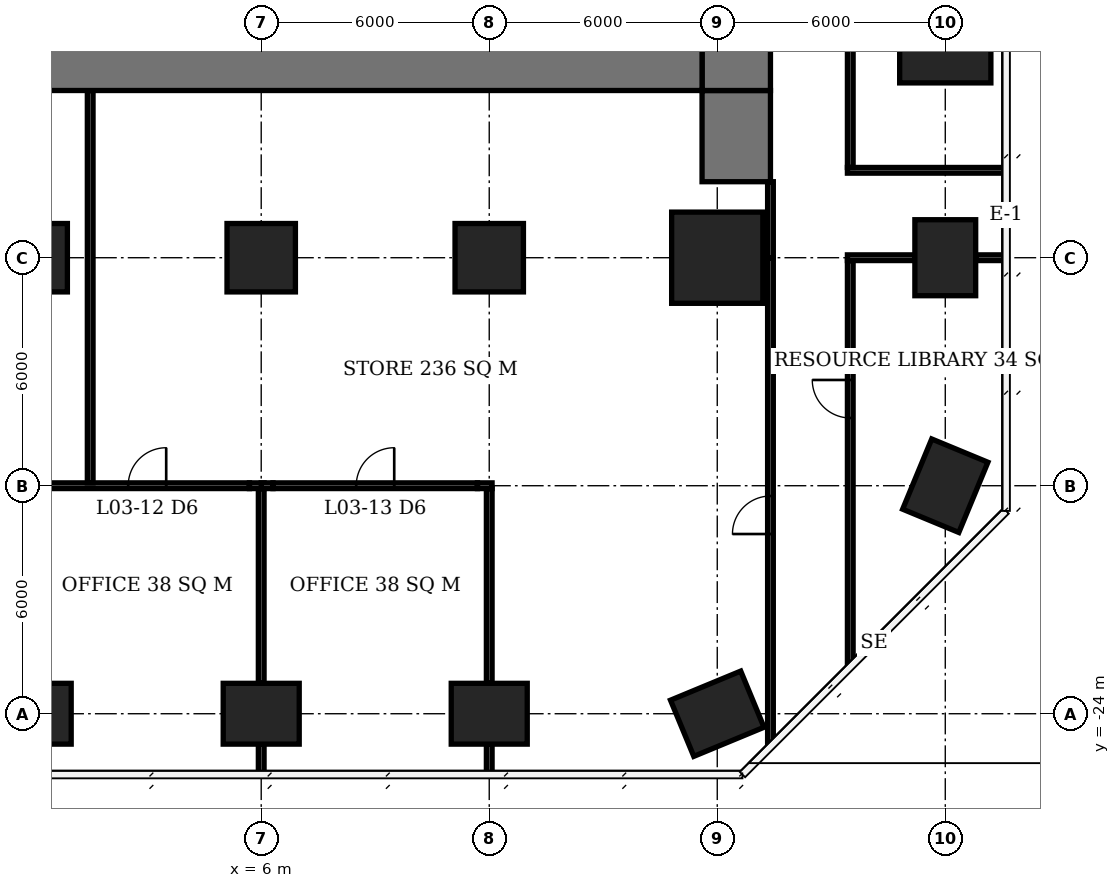
"""IFC4 building model, lengths in metres.
Left out: names, types, materials, properties, quantities, classifications, styles, units other than length and angle.
Written with IfcOpenShell. Run it as: python <this file> out.ifc"""

import sys

from ifc_helpers import new_model, si_unit, direction, frame, frame_2d, origin, origin_2d, place, context, subcontext, project, spatial, rectangle, extrude, element, fill, save


model = new_model("IFC4")
c1 = context("Model", 3, precision=1e-05, world=origin(), true_north=direction((0.0, 1.0)))
c2 = subcontext(c1, "Body", "Model", "MODEL_VIEW")
j1 = project(units=[si_unit("LENGTHUNIT", "METRE"), si_unit("PLANEANGLEUNIT", "RADIAN")], contexts=[c1])
p1 = place(None, origin())
s1 = spatial("IfcSite", under=j1, at=p1, CompositionType="ELEMENT")
p2 = place(p1, origin())
s2 = spatial("IfcBuilding", under=s1, at=p2, CompositionType="ELEMENT")
p3 = place(p2, frame((0.0, 0.0, 18.2)))
s3 = spatial("IfcBuildingStorey", under=s2, at=p3, CompositionType="ELEMENT", Elevation=18.2)
p4 = place(p3, frame((0.0, -24.0, 0.0), z_axis=(0.0, 0.0, 1.0), x_axis=(1.0, 0.0, 0.0)))
e1 = element("IfcColumn", 1, at=p4, inside=s3, PredefinedType="COLUMN", context=c2, shape_type="SweptSolid", body=[
    extrude(rectangle(XDim=2.0, YDim=1.6, at=origin_2d()), origin(), (0.0, 0.0, 1.0), 3.9),
])
p5 = place(p3, frame((0.0, -12.0, 0.0), z_axis=(0.0, 0.0, 1.0), x_axis=(1.0, 0.0, 0.0)))
e2 = element("IfcColumn", 2, at=p5, inside=s3, PredefinedType="COLUMN", context=c2, shape_type="SweptSolid", body=[
    extrude(rectangle(XDim=1.8, YDim=1.8, at=origin_2d()), origin(), (0.0, 0.0, 1.0), 3.9),
])
p6 = place(p3, frame((6.0, -24.0, 0.0), z_axis=(0.0, 0.0, 1.0), x_axis=(1.0, 0.0, 0.0)))
e3 = element("IfcColumn", 3, at=p6, inside=s3, PredefinedType="COLUMN", context=c2, shape_type="SweptSolid", body=[
    extrude(rectangle(XDim=2.0, YDim=1.6, at=origin_2d()), origin(), (0.0, 0.0, 1.0), 3.9),
])
p7 = place(p3, frame((6.0, -12.0, 0.0), z_axis=(0.0, 0.0, 1.0), x_axis=(1.0, 0.0, 0.0)))
e4 = element("IfcColumn", 4, at=p7, inside=s3, PredefinedType="COLUMN", context=c2, shape_type="SweptSolid", body=[
    extrude(rectangle(XDim=1.8, YDim=1.8, at=origin_2d()), origin(), (0.0, 0.0, 1.0), 3.9),
])
p8 = place(p3, frame((12.0, -24.0, 0.0), z_axis=(0.0, 0.0, 1.0), x_axis=(1.0, 0.0, 0.0)))
e5 = element("IfcColumn", 5, at=p8, inside=s3, PredefinedType="COLUMN", context=c2, shape_type="SweptSolid", body=[
    extrude(rectangle(XDim=2.0, YDim=1.6, at=origin_2d()), origin(), (0.0, 0.0, 1.0), 3.9),
])
p9 = place(p3, frame((12.0, -12.0, 0.0), z_axis=(0.0, 0.0, 1.0), x_axis=(1.0, 0.0, 0.0)))
e6 = element("IfcColumn", 6, at=p9, inside=s3, PredefinedType="COLUMN", context=c2, shape_type="SweptSolid", body=[
    extrude(rectangle(XDim=1.8, YDim=1.8, at=origin_2d()), origin(), (0.0, 0.0, 1.0), 3.9),
])
p10 = place(p3, frame((18.0, -24.0, 0.0), z_axis=(0.0, 0.0, 1.0), x_axis=(-0.923879532511, -0.382683432365, 0.0)))
e7 = element("IfcColumn", 7, at=p10, inside=s3, PredefinedType="COLUMN", context=c2, shape_type="SweptSolid", body=[
    extrude(rectangle(XDim=2.0, YDim=1.6, at=origin_2d()), origin(), (0.0, 0.0, 1.0), 3.9),
])
p11 = place(p3, frame((18.0, -12.0, 0.0), z_axis=(0.0, 0.0, 1.0), x_axis=(1.0, 0.0, 0.0)))
e8 = element("IfcColumn", 8, at=p11, inside=s3, PredefinedType="COLUMN", context=c2, shape_type="SweptSolid", body=[
    extrude(rectangle(XDim=2.4, YDim=2.4, at=origin_2d()), origin(), (0.0, 0.0, 1.0), 3.9),
])
for number, where, z_axis, x_axis in (
    (9, (24.0, -18.0, 0.0), (0.0, 0.0, 1.0), (-0.383, -0.924, 0.0)),
    (10, (24.0, -12.0, 0.0), (0.0, 0.0, 1.0), (0.0, 1.0, 0.0)),
):
    element("IfcColumn", number, at=place(p3, frame(where, z_axis=z_axis, x_axis=x_axis)), inside=s3, PredefinedType="COLUMN", context=c2, shape_type="SweptSolid", body=[
        extrude(rectangle(XDim=2.0, YDim=1.6, at=origin_2d()), origin(), (0.0, 0.0, 1.0), 3.9),
    ])
p12 = place(p3, frame((24.0, -6.0, 0.0), z_axis=(0.0, 0.0, 1.0), x_axis=(0.0, 1.0, 0.0)))
e11 = element("IfcColumn", 11, at=p12, inside=s3, PredefinedType="COLUMN", context=c2, shape_type="SweptSolid", body=[
    extrude(rectangle(XDim=2.8, YDim=2.4, at=origin_2d()), origin(), (0.0, 0.0, 1.0), 3.9),
])
p13 = place(p3, frame((-5.6, -6.6, 0.0), z_axis=(0.0, 0.0, 1.0), x_axis=(1.0, 0.0, 0.0)))
e12 = element("IfcWall", 12, at=p13, inside=s3, PredefinedType="SHEAR", context=c2, shape_type="SweptSolid", body=[
    extrude(rectangle(XDim=23.2, YDim=2.0, at=frame_2d((11.6, 0.0))), origin(), (0.0, 0.0, 1.0), 3.9),
])
p14 = place(p3, frame((18.5, -7.6, 0.0), z_axis=(0.0, 0.0, 1.0), x_axis=(0.0, 1.0, 0.0)))
e13 = element("IfcWall", 13, at=p14, inside=s3, PredefinedType="SHEAR", context=c2, shape_type="SweptSolid", body=[
    extrude(rectangle(XDim=21.2, YDim=1.8, at=frame_2d((10.6, 0.0))), origin(), (0.0, 0.0, 1.0), 3.9),
])
p15 = place(p14, frame((9.2, 0.0, 0.0)))
e14 = element("IfcOpeningElement", 14, at=p15, cuts=e13, PredefinedType="OPENING", context=c2, shape_type="SweptSolid", body=[
    extrude(rectangle(XDim=1.8, YDim=2.4, at=frame_2d((0.9, 1.2))), frame((0.0, 0.91, 0.0), z_axis=(0.0, -1.0, 0.0), x_axis=(1.0, 0.0, 0.0)), (0.0, 0.0, 1.0), 1.82),
])
p16 = place(p3, frame((18.5, -10.0, 0.0), z_axis=(0.0, 0.0, 1.0), x_axis=(0.0, 1.0, 0.0)))
e15 = element("IfcWall", 15, at=p16, inside=s3, PredefinedType="SHEAR", context=c2, shape_type="SweptSolid", body=[
    extrude(rectangle(XDim=2.4, YDim=1.8, at=frame_2d((1.2, 0.0))), origin(), (0.0, 0.0, 1.0), 3.9),
])
p17 = place(p3, frame((0.31, -18.0, 0.0), z_axis=(0.0, 0.0, 1.0), x_axis=(1.0, 0.0, 0.0)))
e16 = element("IfcWall", 16, at=p17, inside=s3, PredefinedType="PARTITIONING", context=c2, shape_type="SweptSolid", body=[
    extrude(rectangle(XDim=5.38, YDim=0.15, at=frame_2d((2.69, 0.0))), origin(), (0.0, 0.0, 1.0), 3.65),
])
p18 = place(p17, frame((2.19, 0.0, 0.0)))
e17 = element("IfcOpeningElement", 17, at=p18, cuts=e16, PredefinedType="OPENING", context=c2, shape_type="SweptSolid", body=[
    extrude(rectangle(XDim=1.0, YDim=2.1, at=frame_2d((0.5, 1.05))), frame((0.0, 0.085, 0.0), z_axis=(0.0, -1.0, 0.0), x_axis=(1.0, 0.0, 0.0)), (0.0, 0.0, 1.0), 0.17),
])
p19 = place(p3, frame((5.69, -18.0, 0.0), z_axis=(0.0, 0.0, 1.0), x_axis=(1.0, 0.0, 0.0)))
e18 = element("IfcWall", 18, at=p19, inside=s3, PredefinedType="PARTITIONING", context=c2, shape_type="SweptSolid", body=[
    extrude(rectangle(XDim=0.385, YDim=0.15, at=frame_2d((0.192, 0.0))), origin(), (0.0, 0.0, 1.0), 3.05),
])
p20 = place(p3, frame((6.0, -18.0, 0.0), z_axis=(0.0, 0.0, 1.0), x_axis=(1.0, 0.0, 0.0)))
e19 = element("IfcWall", 19, at=p20, inside=s3, PredefinedType="PARTITIONING", context=c2, shape_type="SweptSolid", body=[
    extrude(rectangle(XDim=0.31, YDim=0.15, at=frame_2d((0.155, 0.0))), origin(), (0.0, 0.0, 1.0), 3.05),
])
p21 = place(p3, frame((6.31, -18.0, 0.0), z_axis=(0.0, 0.0, 1.0), x_axis=(1.0, 0.0, 0.0)))
e20 = element("IfcWall", 20, at=p21, inside=s3, PredefinedType="PARTITIONING", context=c2, shape_type="SweptSolid", body=[
    extrude(rectangle(XDim=5.38, YDim=0.15, at=frame_2d((2.69, 0.0))), origin(), (0.0, 0.0, 1.0), 3.65),
])
p22 = place(p21, frame((2.19, 0.0, 0.0)))
e21 = element("IfcOpeningElement", 21, at=p22, cuts=e20, PredefinedType="OPENING", context=c2, shape_type="SweptSolid", body=[
    extrude(rectangle(XDim=1.0, YDim=2.1, at=frame_2d((0.5, 1.05))), frame((0.0, 0.085, 0.0), z_axis=(0.0, -1.0, 0.0), x_axis=(1.0, 0.0, 0.0)), (0.0, 0.0, 1.0), 0.17),
])
p23 = place(p3, frame((11.69, -18.0, 0.0), z_axis=(0.0, 0.0, 1.0), x_axis=(1.0, 0.0, 0.0)))
e22 = element("IfcWall", 22, at=p23, inside=s3, PredefinedType="PARTITIONING", context=c2, shape_type="SweptSolid", body=[
    extrude(rectangle(XDim=0.385, YDim=0.15, at=frame_2d((0.192, 0.0))), origin(), (0.0, 0.0, 1.0), 3.05),
])
p24 = place(p3, frame((6.0, -25.6, 0.0), z_axis=(0.0, 0.0, 1.0), x_axis=(0.0, 1.0, 0.0)))
e23 = element("IfcWall", 23, at=p24, inside=s3, PredefinedType="PARTITIONING", context=c2, shape_type="SweptSolid", body=[
    extrude(rectangle(XDim=0.8, YDim=0.15, at=frame_2d((0.4, 0.0))), origin(), (0.0, 0.0, 1.0), 3.65),
])
p25 = place(p3, frame((6.0, -23.2, 0.0), z_axis=(0.0, 0.0, 1.0), x_axis=(0.0, 1.0, 0.0)))
e24 = element("IfcWall", 24, at=p25, inside=s3, PredefinedType="PARTITIONING", context=c2, shape_type="SweptSolid", body=[
    extrude(rectangle(XDim=5.125, YDim=0.15, at=frame_2d((2.562, 0.0))), origin(), (0.0, 0.0, 1.0), 3.05),
])
p26 = place(p3, frame((12.0, -25.6, 0.0), z_axis=(0.0, 0.0, 1.0), x_axis=(0.0, 1.0, 0.0)))
e25 = element("IfcWall", 25, at=p26, inside=s3, PredefinedType="PARTITIONING", context=c2, shape_type="SweptSolid", body=[
    extrude(rectangle(XDim=0.8, YDim=0.15, at=frame_2d((0.4, 0.0))), origin(), (0.0, 0.0, 1.0), 3.65),
])
p27 = place(p3, frame((12.0, -23.2, 0.0), z_axis=(0.0, 0.0, 1.0), x_axis=(0.0, 1.0, 0.0)))
e26 = element("IfcWall", 26, at=p27, inside=s3, PredefinedType="PARTITIONING", context=c2, shape_type="SweptSolid", body=[
    extrude(rectangle(XDim=5.125, YDim=0.15, at=frame_2d((2.562, 0.0))), origin(), (0.0, 0.0, 1.0), 3.05),
])
p28 = place(p3, frame((1.5, -17.925, 0.0), z_axis=(0.0, 0.0, 1.0), x_axis=(0.0, 1.0, 0.0)))
e27 = element("IfcWall", 27, at=p28, inside=s3, PredefinedType="PARTITIONING", context=c2, shape_type="SweptSolid", body=[
    extrude(rectangle(XDim=10.325, YDim=0.15, at=frame_2d((5.163, 0.0))), origin(), (0.0, 0.0, 1.0), 3.65),
])
p29 = place(p3, frame((19.4, -24.771, 0.0), z_axis=(0.0, 0.0, 1.0), x_axis=(0.0, 1.0, 0.0)))
e28 = element("IfcWall", 28, at=p29, inside=s3, PredefinedType="PARTITIONING", context=c2, shape_type="SweptSolid", body=[
    extrude(rectangle(XDim=12.771, YDim=0.15, at=frame_2d((6.385, 0.0))), origin(), (0.0, 0.0, 1.0), 3.65),
])
p30 = place(p29, frame((5.5, 0.0, 0.0)))
e29 = element("IfcOpeningElement", 29, at=p30, cuts=e28, PredefinedType="OPENING", context=c2, shape_type="SweptSolid", body=[
    extrude(rectangle(XDim=1.0, YDim=2.1, at=frame_2d((0.5, 1.05))), frame((0.0, 0.085, 0.0), z_axis=(0.0, -1.0, 0.0), x_axis=(1.0, 0.0, 0.0)), (0.0, 0.0, 1.0), 0.17),
])
p31 = place(p3, frame((19.4, -12.0, 0.0), z_axis=(0.0, 0.0, 1.0), x_axis=(0.0, 1.0, 0.0)))
e30 = element("IfcWall", 30, at=p31, inside=s3, PredefinedType="PARTITIONING", context=c2, shape_type="SweptSolid", body=[
    extrude(rectangle(XDim=2.0, YDim=0.15, at=frame_2d((1.0, 0.0))), origin(), (0.0, 0.0, 1.0), 3.65),
])
p32 = place(p3, frame((21.5, -22.671, 0.0), z_axis=(0.0, 0.0, 1.0), x_axis=(0.0, 1.0, 0.0)))
e31 = element("IfcWall", 31, at=p32, inside=s3, PredefinedType="PARTITIONING", context=c2, shape_type="SweptSolid", body=[
    extrude(rectangle(XDim=10.596, YDim=0.15, at=frame_2d((5.298, 0.0))), origin(), (0.0, 0.0, 1.0), 3.65),
])
p33 = place(p32, frame((6.454, 0.0, 0.0)))
e32 = element("IfcOpeningElement", 32, at=p33, cuts=e31, PredefinedType="OPENING", context=c2, shape_type="SweptSolid", body=[
    extrude(rectangle(XDim=1.0, YDim=2.1, at=frame_2d((0.5, 1.05))), frame((0.0, 0.085, 0.0), z_axis=(0.0, -1.0, 0.0), x_axis=(1.0, 0.0, 0.0)), (0.0, 0.0, 1.0), 0.17),
])
p34 = place(p3, frame((21.425, -12.0, 0.0), z_axis=(0.0, 0.0, 1.0), x_axis=(1.0, 0.0, 0.0)))
e33 = element("IfcWall", 33, at=p34, inside=s3, PredefinedType="PARTITIONING", context=c2, shape_type="SweptSolid", body=[
    extrude(rectangle(XDim=1.775, YDim=0.15, at=frame_2d((0.887, 0.0))), origin(), (0.0, 0.0, 1.0), 3.65),
])
p35 = place(p3, frame((24.8, -12.0, 0.0), z_axis=(0.0, 0.0, 1.0), x_axis=(1.0, 0.0, 0.0)))
e34 = element("IfcWall", 34, at=p35, inside=s3, PredefinedType="PARTITIONING", context=c2, shape_type="SweptSolid", body=[
    extrude(rectangle(XDim=0.8, YDim=0.15, at=frame_2d((0.4, 0.0))), origin(), (0.0, 0.0, 1.0), 3.65),
])
p36 = place(p3, frame((21.5, -9.625, 0.0), z_axis=(0.0, 0.0, 1.0), x_axis=(0.0, 1.0, 0.0)))
e35 = element("IfcWall", 35, at=p36, inside=s3, PredefinedType="PARTITIONING", context=c2, shape_type="SweptSolid", body=[
    extrude(rectangle(XDim=32.296, YDim=0.15, at=frame_2d((16.148, 0.0))), origin(), (0.0, 0.0, 1.0), 3.65),
])
p37 = place(p36, frame((20.434, 0.0, 0.0)))
e36 = element("IfcOpeningElement", 36, at=p37, cuts=e35, PredefinedType="OPENING", context=c2, shape_type="SweptSolid", body=[
    extrude(rectangle(XDim=1.0, YDim=2.1, at=frame_2d((0.5, 1.05))), frame((0.0, 0.085, 0.0), z_axis=(0.0, -1.0, 0.0), x_axis=(1.0, 0.0, 0.0)), (0.0, 0.0, 1.0), 0.17),
])
p38 = place(p3, frame((21.425, -9.7, 0.0), z_axis=(0.0, 0.0, 1.0), x_axis=(1.0, 0.0, 0.0)))
e37 = element("IfcWall", 37, at=p38, inside=s3, PredefinedType="PARTITIONING", context=c2, shape_type="SweptSolid", body=[
    extrude(rectangle(XDim=4.175, YDim=0.15, at=frame_2d((2.087, 0.0))), origin(), (0.0, 0.0, 1.0), 3.65),
])
p39 = place(p18, origin())
e38 = element("IfcDoor", 38, at=p39, inside=s3, OperationType="SINGLE_SWING_RIGHT", PredefinedType="DOOR", context=c2, shape_type="SweptSolid", body=[
    extrude(rectangle(XDim=1.0, YDim=2.1, at=frame_2d((0.5, 1.05))), frame((0.0, 0.025, 0.0), z_axis=(0.0, -1.0, 0.0), x_axis=(1.0, 0.0, 0.0)), (0.0, 0.0, 1.0), 0.05),
])
fill(e17, e38)
p40 = place(p22, origin())
e39 = element("IfcDoor", 39, at=p40, inside=s3, OperationType="SINGLE_SWING_RIGHT", PredefinedType="DOOR", context=c2, shape_type="SweptSolid", body=[
    extrude(rectangle(XDim=1.0, YDim=2.1, at=frame_2d((0.5, 1.05))), frame((0.0, 0.025, 0.0), z_axis=(0.0, -1.0, 0.0), x_axis=(1.0, 0.0, 0.0)), (0.0, 0.0, 1.0), 0.05),
])
fill(e21, e39)
p41 = place(p33, origin())
e40 = element("IfcDoor", 40, at=p41, inside=s3, OperationType="SINGLE_SWING_RIGHT", PredefinedType="DOOR", context=c2, shape_type="SweptSolid", body=[
    extrude(rectangle(XDim=1.0, YDim=2.1, at=frame_2d((0.5, 1.05))), frame((0.0, 0.025, 0.0), z_axis=(0.0, -1.0, 0.0), x_axis=(1.0, 0.0, 0.0)), (0.0, 0.0, 1.0), 0.05),
])
fill(e32, e40)
p42 = place(p30, origin())
e41 = element("IfcDoor", 41, at=p42, inside=s3, OperationType="SINGLE_SWING_LEFT", PredefinedType="DOOR", context=c2, shape_type="SweptSolid", body=[
    extrude(rectangle(XDim=1.0, YDim=2.1, at=frame_2d((0.5, 1.05))), frame((0.0, 0.025, 0.0), z_axis=(0.0, -1.0, 0.0), x_axis=(1.0, 0.0, 0.0)), (0.0, 0.0, 1.0), 0.05),
])
fill(e29, e41)
save(model, sys.argv[1])
